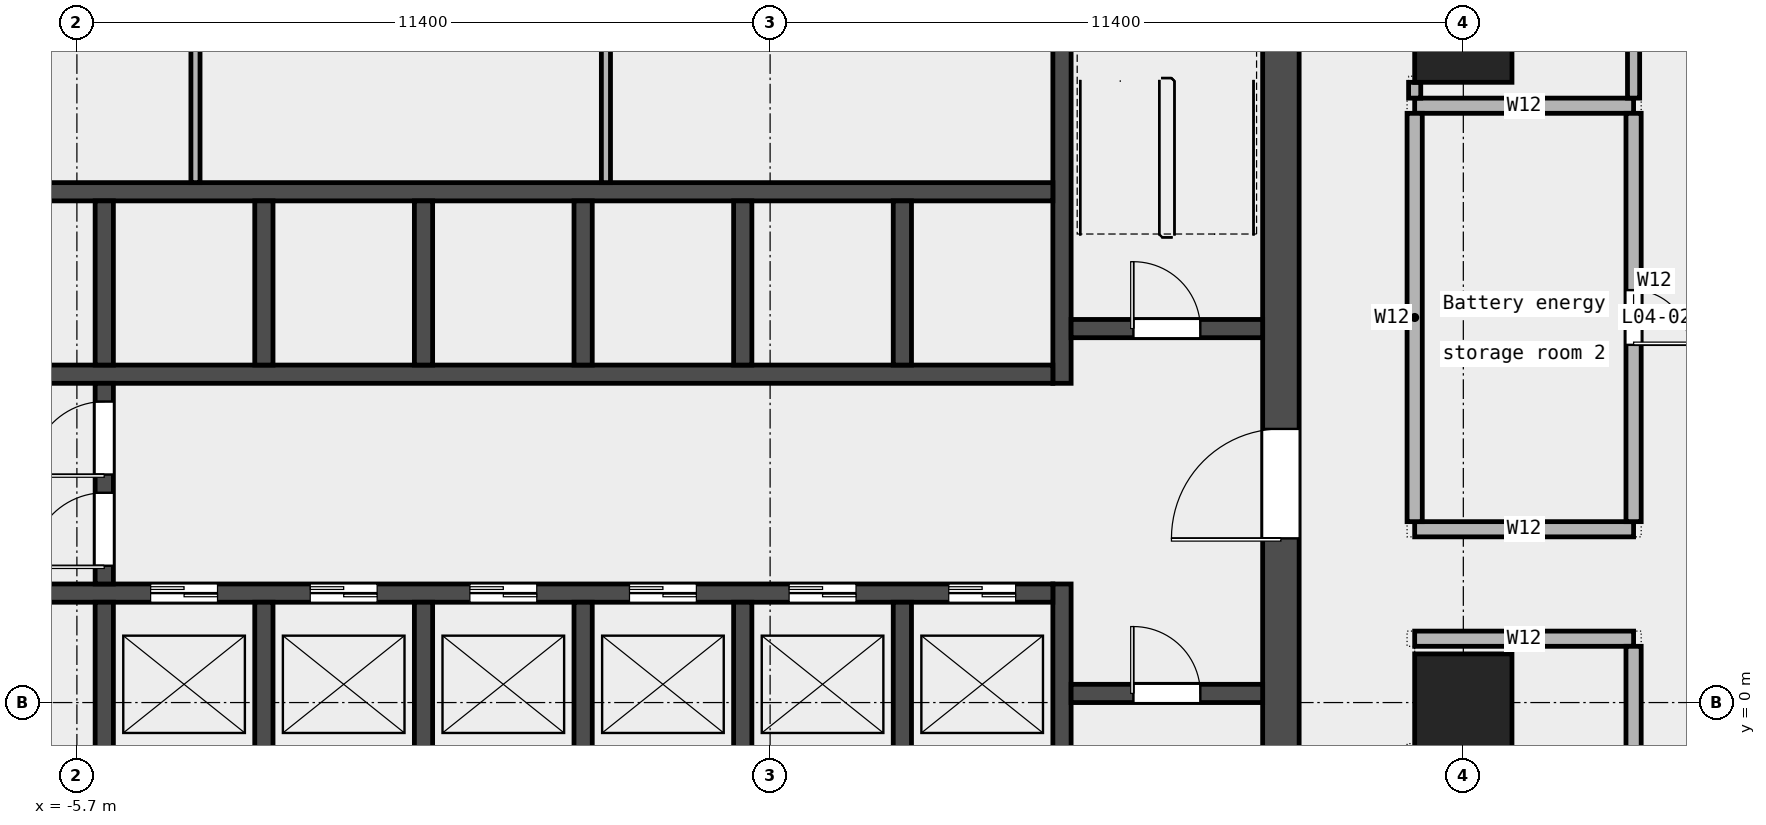
"""IFC4 building model, lengths in metres.
Left out: names, types, materials, properties, quantities, classifications, styles, units other than length and angle.
Written with IfcOpenShell. Run it as: python <this file> out.ifc"""

import sys

from ifc_helpers import new_model, si_unit, direction, frame, frame_2d, origin, origin_2d, place, context, subcontext, project, spatial, rectangle, extrude, element, fill, save


model = new_model("IFC4")
c1 = context("Model", 3, precision=1e-05, world=origin(), true_north=direction((0.0, 1.0)))
c2 = subcontext(c1, "Body", "Model", "MODEL_VIEW")
j1 = project(units=[si_unit("LENGTHUNIT", "METRE"), si_unit("PLANEANGLEUNIT", "RADIAN")], contexts=[c1])
p1 = place(None, origin())
s1 = spatial("IfcSite", under=j1, at=p1, CompositionType="ELEMENT")
p2 = place(p1, origin())
s2 = spatial("IfcBuilding", under=s1, at=p2, CompositionType="ELEMENT")
p3 = place(p2, frame((0.0, 0.0, 25.5)))
s3 = spatial("IfcBuildingStorey", under=s2, at=p3, CompositionType="ELEMENT", Elevation=25.5)
for number, where, z_axis, x_axis in (
    (1, (17.1, 0.0, 0.0), (0.0, 0.0, 1.0), (1.0, 0.0, 0.0)),
    (2, (17.1, 11.0, 0.0), (0.0, 0.0, 1.0), (1.0, 0.0, 0.0)),
):
    element("IfcColumn", number, at=place(p3, frame(where, z_axis=z_axis, x_axis=x_axis)), inside=s3, PredefinedType="COLUMN", context=c2, shape_type="SweptSolid", body=[
        extrude(rectangle(XDim=1.6, YDim=1.6, at=origin_2d()), origin(), (0.0, 0.0, 1.0), 5.05),
    ])
for number, where, z_axis, x_axis in (
    (3, (16.3, 1.05, 0.0), (0.0, 0.0, 1.0), (1.0, 0.0, 0.0)),
    (4, (16.3, 2.85, 0.0), (0.0, 0.0, 1.0), (1.0, 0.0, 0.0)),
    (5, (16.3, 9.815, 0.0), (0.0, 0.0, 1.0), (1.0, 0.0, 0.0)),
):
    element("IfcWall", number, at=place(p3, frame(where, z_axis=z_axis, x_axis=x_axis)), inside=s3, PredefinedType="PARTITIONING", context=c2, shape_type="SweptSolid", body=[
        extrude(rectangle(XDim=3.6, YDim=0.25, at=frame_2d((1.8, 0.0))), origin(), (0.0, 0.0, 1.0), 5.05),
    ])
p4 = place(p3, frame((16.3, 9.94, 0.0), z_axis=(0.0, 0.0, 1.0), x_axis=(0.0, 1.0, 0.0)))
e6 = element("IfcWall", 6, at=p4, inside=s3, PredefinedType="PARTITIONING", context=c2, shape_type="SweptSolid", body=[
    extrude(rectangle(XDim=0.26, YDim=0.2, at=frame_2d((0.13, 0.0))), origin(), (0.0, 0.0, 1.0), 5.05),
])
p5 = place(p3, frame((16.3, 2.975, 0.0), z_axis=(0.0, 0.0, 1.0), x_axis=(0.0, 1.0, 0.0)))
e7 = element("IfcWall", 7, at=p5, inside=s3, PredefinedType="PARTITIONING", context=c2, shape_type="SweptSolid", body=[
    extrude(rectangle(XDim=6.715, YDim=0.25, at=frame_2d((3.357, 0.0))), origin(), (0.0, 0.0, 1.0), 5.05),
])
p6 = place(p3, frame((19.9, 9.94, 0.0), z_axis=(0.0, 0.0, 1.0), x_axis=(0.0, 1.0, 0.0)))
e8 = element("IfcWall", 8, at=p6, inside=s3, PredefinedType="PARTITIONING", context=c2, shape_type="SweptSolid", body=[
    extrude(rectangle(XDim=5.335, YDim=0.2, at=frame_2d((2.667, 0.0))), origin(), (0.0, 0.0, 1.0), 5.05),
])
p7 = place(p6, frame((2.218, 0.0, 0.0)))
e9 = element("IfcOpeningElement", 9, at=p7, cuts=e8, PredefinedType="OPENING", context=c2, shape_type="SweptSolid", body=[
    extrude(rectangle(XDim=0.9, YDim=2.1, at=frame_2d((0.45, 1.05))), frame((0.0, 0.112, 0.0), z_axis=(0.0, -1.0, 0.0), x_axis=(1.0, 0.0, 0.0)), (0.0, 0.0, 1.0), 0.224),
])
p8 = place(p3, frame((19.9, -8.95, 0.0), z_axis=(0.0, 0.0, 1.0), x_axis=(0.0, 1.0, 0.0)))
e10 = element("IfcWall", 10, at=p8, inside=s3, PredefinedType="PARTITIONING", context=c2, shape_type="SweptSolid", body=[
    extrude(rectangle(XDim=9.875, YDim=0.25, at=frame_2d((4.938, 0.0))), origin(), (0.0, 0.0, 1.0), 5.05),
])
p9 = place(p8, frame((4.488, 0.0, 0.0)))
e11 = element("IfcOpeningElement", 11, at=p9, cuts=e10, PredefinedType="OPENING", context=c2, shape_type="SweptSolid", body=[
    extrude(rectangle(XDim=0.9, YDim=2.1, at=frame_2d((0.45, 1.05))), frame((0.0, 0.137, 0.0), z_axis=(0.0, -1.0, 0.0), x_axis=(1.0, 0.0, 0.0)), (0.0, 0.0, 1.0), 0.274),
])
p10 = place(p3, frame((19.9, 2.975, 0.0), z_axis=(0.0, 0.0, 1.0), x_axis=(0.0, 1.0, 0.0)))
e12 = element("IfcWall", 12, at=p10, inside=s3, PredefinedType="PARTITIONING", context=c2, shape_type="SweptSolid", body=[
    extrude(rectangle(XDim=6.715, YDim=0.25, at=frame_2d((3.357, 0.0))), origin(), (0.0, 0.0, 1.0), 5.05),
])
p11 = place(p10, frame((2.907, 0.0, 0.0)))
e13 = element("IfcOpeningElement", 13, at=p11, cuts=e12, PredefinedType="OPENING", context=c2, shape_type="SweptSolid", body=[
    extrude(rectangle(XDim=0.9, YDim=2.1, at=frame_2d((0.45, 1.05))), frame((0.0, 0.137, 0.0), z_axis=(0.0, -1.0, 0.0), x_axis=(1.0, 0.0, 0.0)), (0.0, 0.0, 1.0), 0.274),
])
p12 = place(p3, frame((14.1, -6.6, 0.0), z_axis=(0.0, 0.0, 1.0), x_axis=(0.0, 1.0, 0.0)))
e14 = element("IfcWall", 14, at=p12, inside=s3, PredefinedType="SHEAR", context=c2, shape_type="SweptSolid", body=[
    extrude(rectangle(XDim=19.5, YDim=0.6, at=frame_2d((9.75, 0.0))), origin(), (0.0, 0.0, 1.0), 5.2),
])
p13 = place(p12, frame((9.3, 0.0, 0.0)))
e15 = element("IfcOpeningElement", 15, at=p13, cuts=e14, PredefinedType="OPENING", context=c2, shape_type="SweptSolid", body=[
    extrude(rectangle(XDim=1.8, YDim=2.1, at=frame_2d((0.9, 1.05))), frame((0.0, 0.312, 0.0), z_axis=(0.0, -1.0, 0.0), x_axis=(1.0, 0.0, 0.0)), (0.0, 0.0, 1.0), 0.624),
])
p14 = place(p3, frame((10.5, -6.6, 0.0), z_axis=(0.0, 0.0, 1.0), x_axis=(0.0, 1.0, 0.0)))
e16 = element("IfcWall", 16, at=p14, inside=s3, PredefinedType="SHEAR", context=c2, shape_type="SweptSolid", body=[
    extrude(rectangle(XDim=8.55, YDim=0.3, at=frame_2d((4.275, 0.0))), origin(), (0.0, 0.0, 1.0), 5.2),
])
p15 = place(p3, frame((10.5, 5.25, 0.0), z_axis=(0.0, 0.0, 1.0), x_axis=(0.0, 1.0, 0.0)))
e17 = element("IfcWall", 17, at=p15, inside=s3, PredefinedType="SHEAR", context=c2, shape_type="SweptSolid", body=[
    extrude(rectangle(XDim=7.65, YDim=0.3, at=frame_2d((3.825, 0.0))), origin(), (0.0, 0.0, 1.0), 5.2),
])
p16 = place(p3, frame((10.65, 0.15, 0.0), z_axis=(0.0, 0.0, 1.0), x_axis=(1.0, 0.0, 0.0)))
e18 = element("IfcWall", 18, at=p16, inside=s3, PredefinedType="SOLIDWALL", context=c2, shape_type="SweptSolid", body=[
    extrude(rectangle(XDim=3.15, YDim=0.3, at=frame_2d((1.575, 0.0))), origin(), (0.0, 0.0, 1.0), 5.2),
])
p17 = place(p16, frame((1.025, 0.0, 0.0)))
e19 = element("IfcOpeningElement", 19, at=p17, cuts=e18, PredefinedType="OPENING", context=c2, shape_type="SweptSolid", body=[
    extrude(rectangle(XDim=1.1, YDim=2.1, at=frame_2d((0.55, 1.05))), frame((0.0, 0.162, 0.0), z_axis=(0.0, -1.0, 0.0), x_axis=(1.0, 0.0, 0.0)), (0.0, 0.0, 1.0), 0.324),
])
p18 = place(p3, frame((10.65, 6.15, 0.0), z_axis=(0.0, 0.0, 1.0), x_axis=(1.0, 0.0, 0.0)))
e20 = element("IfcWall", 20, at=p18, inside=s3, PredefinedType="SOLIDWALL", context=c2, shape_type="SweptSolid", body=[
    extrude(rectangle(XDim=3.15, YDim=0.3, at=frame_2d((1.575, 0.0))), origin(), (0.0, 0.0, 1.0), 5.2),
])
p19 = place(p18, frame((1.025, 0.0, 0.0)))
e21 = element("IfcOpeningElement", 21, at=p19, cuts=e20, PredefinedType="OPENING", context=c2, shape_type="SweptSolid", body=[
    extrude(rectangle(XDim=1.1, YDim=2.1, at=frame_2d((0.55, 1.05))), frame((0.0, 0.162, 0.0), z_axis=(0.0, -1.0, 0.0), x_axis=(1.0, 0.0, 0.0)), (0.0, 0.0, 1.0), 0.324),
])
p20 = place(p3, frame((-10.35, 1.8, 0.0), z_axis=(0.0, 0.0, 1.0), x_axis=(1.0, 0.0, 0.0)))
e22 = element("IfcWall", 22, at=p20, inside=s3, PredefinedType="SOLIDWALL", context=c2, shape_type="SweptSolid", body=[
    extrude(rectangle(XDim=20.7, YDim=0.3, at=frame_2d((10.35, 0.0))), origin(), (0.0, 0.0, 1.0), 5.2),
])
p21 = place(p20, frame((0.512, 0.0, 0.0)))
e23 = element("IfcOpeningElement", 23, at=p21, cuts=e22, PredefinedType="OPENING", context=c2, shape_type="SweptSolid", body=[
    extrude(rectangle(XDim=1.3, YDim=2.1, at=frame_2d((0.65, 1.05))), frame((0.0, 0.162, 0.0), z_axis=(0.0, -1.0, 0.0), x_axis=(1.0, 0.0, 0.0)), (0.0, 0.0, 1.0), 0.324),
])
p22 = place(p20, frame((5.863, 0.0, 0.0)))
e24 = element("IfcOpeningElement", 24, at=p22, cuts=e22, PredefinedType="OPENING", context=c2, shape_type="SweptSolid", body=[
    extrude(rectangle(XDim=1.1, YDim=2.1, at=frame_2d((0.55, 1.05))), frame((0.0, 0.162, 0.0), z_axis=(0.0, -1.0, 0.0), x_axis=(1.0, 0.0, 0.0)), (0.0, 0.0, 1.0), 0.324),
])
p23 = place(p20, frame((8.488, 0.0, 0.0)))
e25 = element("IfcOpeningElement", 25, at=p23, cuts=e22, PredefinedType="OPENING", context=c2, shape_type="SweptSolid", body=[
    extrude(rectangle(XDim=1.1, YDim=2.1, at=frame_2d((0.55, 1.05))), frame((0.0, 0.162, 0.0), z_axis=(0.0, -1.0, 0.0), x_axis=(1.0, 0.0, 0.0)), (0.0, 0.0, 1.0), 0.324),
])
p24 = place(p20, frame((11.113, 0.0, 0.0)))
e26 = element("IfcOpeningElement", 26, at=p24, cuts=e22, PredefinedType="OPENING", context=c2, shape_type="SweptSolid", body=[
    extrude(rectangle(XDim=1.1, YDim=2.1, at=frame_2d((0.55, 1.05))), frame((0.0, 0.162, 0.0), z_axis=(0.0, -1.0, 0.0), x_axis=(1.0, 0.0, 0.0)), (0.0, 0.0, 1.0), 0.324),
])
p25 = place(p20, frame((13.738, 0.0, 0.0)))
e27 = element("IfcOpeningElement", 27, at=p25, cuts=e22, PredefinedType="OPENING", context=c2, shape_type="SweptSolid", body=[
    extrude(rectangle(XDim=1.1, YDim=2.1, at=frame_2d((0.55, 1.05))), frame((0.0, 0.162, 0.0), z_axis=(0.0, -1.0, 0.0), x_axis=(1.0, 0.0, 0.0)), (0.0, 0.0, 1.0), 0.324),
])
p26 = place(p20, frame((16.363, 0.0, 0.0)))
e28 = element("IfcOpeningElement", 28, at=p26, cuts=e22, PredefinedType="OPENING", context=c2, shape_type="SweptSolid", body=[
    extrude(rectangle(XDim=1.1, YDim=2.1, at=frame_2d((0.55, 1.05))), frame((0.0, 0.162, 0.0), z_axis=(0.0, -1.0, 0.0), x_axis=(1.0, 0.0, 0.0)), (0.0, 0.0, 1.0), 0.324),
])
p27 = place(p20, frame((18.988, 0.0, 0.0)))
e29 = element("IfcOpeningElement", 29, at=p27, cuts=e22, PredefinedType="OPENING", context=c2, shape_type="SweptSolid", body=[
    extrude(rectangle(XDim=1.1, YDim=2.1, at=frame_2d((0.55, 1.05))), frame((0.0, 0.162, 0.0), z_axis=(0.0, -1.0, 0.0), x_axis=(1.0, 0.0, 0.0)), (0.0, 0.0, 1.0), 0.324),
])
p28 = place(p3, frame((-10.35, 5.4, 0.0), z_axis=(0.0, 0.0, 1.0), x_axis=(1.0, 0.0, 0.0)))
e30 = element("IfcWall", 30, at=p28, inside=s3, PredefinedType="SOLIDWALL", context=c2, shape_type="SweptSolid", body=[
    extrude(rectangle(XDim=20.7, YDim=0.3, at=frame_2d((10.35, 0.0))), origin(), (0.0, 0.0, 1.0), 5.2),
])
p29 = place(p28, frame((0.512, 0.0, 0.0)))
e31 = element("IfcOpeningElement", 31, at=p29, cuts=e30, PredefinedType="OPENING", context=c2, shape_type="SweptSolid", body=[
    extrude(rectangle(XDim=1.3, YDim=2.1, at=frame_2d((0.65, 1.05))), frame((0.0, 0.162, 0.0), z_axis=(0.0, -1.0, 0.0), x_axis=(1.0, 0.0, 0.0)), (0.0, 0.0, 1.0), 0.324),
])
p30 = place(p3, frame((-10.35, 8.4, 0.0), z_axis=(0.0, 0.0, 1.0), x_axis=(1.0, 0.0, 0.0)))
e32 = element("IfcWall", 32, at=p30, inside=s3, PredefinedType="SOLIDWALL", context=c2, shape_type="SweptSolid", body=[
    extrude(rectangle(XDim=20.7, YDim=0.3, at=frame_2d((10.35, 0.0))), origin(), (0.0, 0.0, 1.0), 5.2),
])
for number, where, z_axis, x_axis in (
    (33, (-5.25, -1.05, 0.0), (0.0, 0.0, 1.0), (0.0, 1.0, 0.0)),
    (34, (-2.625, -1.05, 0.0), (0.0, 0.0, 1.0), (0.0, 1.0, 0.0)),
    (35, (0.0, -1.05, 0.0), (0.0, 0.0, 1.0), (0.0, 1.0, 0.0)),
    (36, (2.625, -1.05, 0.0), (0.0, 0.0, 1.0), (0.0, 1.0, 0.0)),
    (37, (5.25, -1.05, 0.0), (0.0, 0.0, 1.0), (0.0, 1.0, 0.0)),
    (38, (7.875, -1.05, 0.0), (0.0, 0.0, 1.0), (0.0, 1.0, 0.0)),
    (39, (-5.25, 5.55, 0.0), (0.0, 0.0, 1.0), (0.0, 1.0, 0.0)),
    (40, (-2.625, 5.55, 0.0), (0.0, 0.0, 1.0), (0.0, 1.0, 0.0)),
    (41, (0.0, 5.55, 0.0), (0.0, 0.0, 1.0), (0.0, 1.0, 0.0)),
    (42, (2.625, 5.55, 0.0), (0.0, 0.0, 1.0), (0.0, 1.0, 0.0)),
    (43, (5.25, 5.55, 0.0), (0.0, 0.0, 1.0), (0.0, 1.0, 0.0)),
    (44, (7.875, 5.55, 0.0), (0.0, 0.0, 1.0), (0.0, 1.0, 0.0)),
):
    element("IfcWall", number, at=place(p3, frame(where, z_axis=z_axis, x_axis=x_axis)), inside=s3, PredefinedType="SOLIDWALL", context=c2, shape_type="SweptSolid", body=[
        extrude(rectangle(XDim=2.7, YDim=0.3, at=frame_2d((1.35, 0.0))), origin(), (0.0, 0.0, 1.0), 5.2),
    ])
p31 = place(p3, frame((-5.25, 1.95, 0.0), z_axis=(0.0, 0.0, 1.0), x_axis=(0.0, 1.0, 0.0)))
e45 = element("IfcWall", 45, at=p31, inside=s3, PredefinedType="SOLIDWALL", context=c2, shape_type="SweptSolid", body=[
    extrude(rectangle(XDim=3.3, YDim=0.3, at=frame_2d((1.65, 0.0))), origin(), (0.0, 0.0, 1.0), 5.2),
])
p32 = place(p31, frame((0.3, 0.0, 0.0)))
e46 = element("IfcOpeningElement", 46, at=p32, cuts=e45, PredefinedType="OPENING", context=c2, shape_type="SweptSolid", body=[
    extrude(rectangle(XDim=1.2, YDim=2.1, at=frame_2d((0.6, 1.05))), frame((0.0, 0.162, 0.0), z_axis=(0.0, -1.0, 0.0), x_axis=(1.0, 0.0, 0.0)), (0.0, 0.0, 1.0), 0.324),
])
p33 = place(p31, frame((1.8, 0.0, 0.0)))
e47 = element("IfcOpeningElement", 47, at=p33, cuts=e45, PredefinedType="OPENING", context=c2, shape_type="SweptSolid", body=[
    extrude(rectangle(XDim=1.2, YDim=2.1, at=frame_2d((0.6, 1.05))), frame((0.0, 0.162, 0.0), z_axis=(0.0, -1.0, 0.0), x_axis=(1.0, 0.0, 0.0)), (0.0, 0.0, 1.0), 0.324),
])
for number, where, z_axis, x_axis in (
    (48, (-3.75, 8.55, 0.0), (0.0, 0.0, 1.0), (0.0, 1.0, 0.0)),
    (49, (3.0, 8.55, 0.0), (0.0, 0.0, 1.0), (0.0, 1.0, 0.0)),
):
    element("IfcWall", number, at=place(p3, frame(where, z_axis=z_axis, x_axis=x_axis)), inside=s3, PredefinedType="PARTITIONING", context=c2, shape_type="SweptSolid", body=[
        extrude(rectangle(XDim=4.35, YDim=0.15, at=frame_2d((2.175, 0.0))), origin(), (0.0, 0.0, 1.0), 5.2),
    ])
p34 = place(p11, origin())
e50 = element("IfcDoor", 50, at=p34, inside=s3, OperationType="SINGLE_SWING_RIGHT", PredefinedType="DOOR", context=c2, shape_type="SweptSolid", body=[
    extrude(rectangle(XDim=0.9, YDim=2.1, at=frame_2d((0.45, 1.05))), frame((0.0, 0.025, 0.0), z_axis=(0.0, -1.0, 0.0), x_axis=(1.0, 0.0, 0.0)), (0.0, 0.0, 1.0), 0.05),
])
fill(e13, e50)
p35 = place(p17, origin())
e51 = element("IfcDoor", 51, at=p35, inside=s3, OperationType="SINGLE_SWING_RIGHT", PredefinedType="DOOR", context=c2, shape_type="SweptSolid", body=[
    extrude(rectangle(XDim=1.1, YDim=2.1, at=frame_2d((0.55, 1.05))), frame((0.0, 0.025, 0.0), z_axis=(0.0, -1.0, 0.0), x_axis=(1.0, 0.0, 0.0)), (0.0, 0.0, 1.0), 0.05),
])
fill(e19, e51)
p36 = place(p19, origin())
e52 = element("IfcDoor", 52, at=p36, inside=s3, OperationType="SINGLE_SWING_RIGHT", PredefinedType="DOOR", context=c2, shape_type="SweptSolid", body=[
    extrude(rectangle(XDim=1.1, YDim=2.1, at=frame_2d((0.55, 1.05))), frame((0.0, 0.025, 0.0), z_axis=(0.0, -1.0, 0.0), x_axis=(1.0, 0.0, 0.0)), (0.0, 0.0, 1.0), 0.05),
])
fill(e21, e52)
p37 = place(p13, origin())
e53 = element("IfcDoor", 53, at=p37, inside=s3, OperationType="DOUBLE_DOOR_SINGLE_SWING", PredefinedType="DOOR", context=c2, shape_type="SweptSolid", body=[
    extrude(rectangle(XDim=1.8, YDim=2.1, at=frame_2d((0.9, 1.05))), frame((0.0, 0.025, 0.0), z_axis=(0.0, -1.0, 0.0), x_axis=(1.0, 0.0, 0.0)), (0.0, 0.0, 1.0), 0.05),
])
fill(e15, e53)
p38 = place(p32, origin())
e54 = element("IfcDoor", 54, at=p38, inside=s3, OperationType="SINGLE_SWING_LEFT", PredefinedType="DOOR", context=c2, shape_type="SweptSolid", body=[
    extrude(rectangle(XDim=1.2, YDim=2.1, at=frame_2d((0.6, 1.05))), frame((0.0, 0.025, 0.0), z_axis=(0.0, -1.0, 0.0), x_axis=(1.0, 0.0, 0.0)), (0.0, 0.0, 1.0), 0.05),
])
fill(e46, e54)
p39 = place(p33, origin())
e55 = element("IfcDoor", 55, at=p39, inside=s3, OperationType="SINGLE_SWING_RIGHT", PredefinedType="DOOR", context=c2, shape_type="SweptSolid", body=[
    extrude(rectangle(XDim=1.2, YDim=2.1, at=frame_2d((0.6, 1.05))), frame((0.0, 0.025, 0.0), z_axis=(0.0, -1.0, 0.0), x_axis=(1.0, 0.0, 0.0)), (0.0, 0.0, 1.0), 0.05),
])
fill(e47, e55)
p40 = place(p22, origin())
e56 = element("IfcDoor", 56, at=p40, inside=s3, OperationType="DOUBLE_DOOR_SLIDING", PredefinedType="DOOR", context=c2, shape_type="SweptSolid", body=[
    extrude(rectangle(XDim=1.1, YDim=2.1, at=frame_2d((0.55, 1.05))), frame((0.0, 0.025, 0.0), z_axis=(0.0, -1.0, 0.0), x_axis=(1.0, 0.0, 0.0)), (0.0, 0.0, 1.0), 0.05),
])
fill(e24, e56)
p41 = place(p23, origin())
e57 = element("IfcDoor", 57, at=p41, inside=s3, OperationType="DOUBLE_DOOR_SLIDING", PredefinedType="DOOR", context=c2, shape_type="SweptSolid", body=[
    extrude(rectangle(XDim=1.1, YDim=2.1, at=frame_2d((0.55, 1.05))), frame((0.0, 0.025, 0.0), z_axis=(0.0, -1.0, 0.0), x_axis=(1.0, 0.0, 0.0)), (0.0, 0.0, 1.0), 0.05),
])
fill(e25, e57)
p42 = place(p24, origin())
e58 = element("IfcDoor", 58, at=p42, inside=s3, OperationType="DOUBLE_DOOR_SLIDING", PredefinedType="DOOR", context=c2, shape_type="SweptSolid", body=[
    extrude(rectangle(XDim=1.1, YDim=2.1, at=frame_2d((0.55, 1.05))), frame((0.0, 0.025, 0.0), z_axis=(0.0, -1.0, 0.0), x_axis=(1.0, 0.0, 0.0)), (0.0, 0.0, 1.0), 0.05),
])
fill(e26, e58)
p43 = place(p25, origin())
e59 = element("IfcDoor", 59, at=p43, inside=s3, OperationType="DOUBLE_DOOR_SLIDING", PredefinedType="DOOR", context=c2, shape_type="SweptSolid", body=[
    extrude(rectangle(XDim=1.1, YDim=2.1, at=frame_2d((0.55, 1.05))), frame((0.0, 0.025, 0.0), z_axis=(0.0, -1.0, 0.0), x_axis=(1.0, 0.0, 0.0)), (0.0, 0.0, 1.0), 0.05),
])
fill(e27, e59)
p44 = place(p26, origin())
e60 = element("IfcDoor", 60, at=p44, inside=s3, OperationType="DOUBLE_DOOR_SLIDING", PredefinedType="DOOR", context=c2, shape_type="SweptSolid", body=[
    extrude(rectangle(XDim=1.1, YDim=2.1, at=frame_2d((0.55, 1.05))), frame((0.0, 0.025, 0.0), z_axis=(0.0, -1.0, 0.0), x_axis=(1.0, 0.0, 0.0)), (0.0, 0.0, 1.0), 0.05),
])
fill(e28, e60)
p45 = place(p27, origin())
e61 = element("IfcDoor", 61, at=p45, inside=s3, OperationType="DOUBLE_DOOR_SLIDING", PredefinedType="DOOR", context=c2, shape_type="SweptSolid", body=[
    extrude(rectangle(XDim=1.1, YDim=2.1, at=frame_2d((0.55, 1.05))), frame((0.0, 0.025, 0.0), z_axis=(0.0, -1.0, 0.0), x_axis=(1.0, 0.0, 0.0)), (0.0, 0.0, 1.0), 0.05),
])
fill(e29, e61)
save(model, sys.argv[1])
